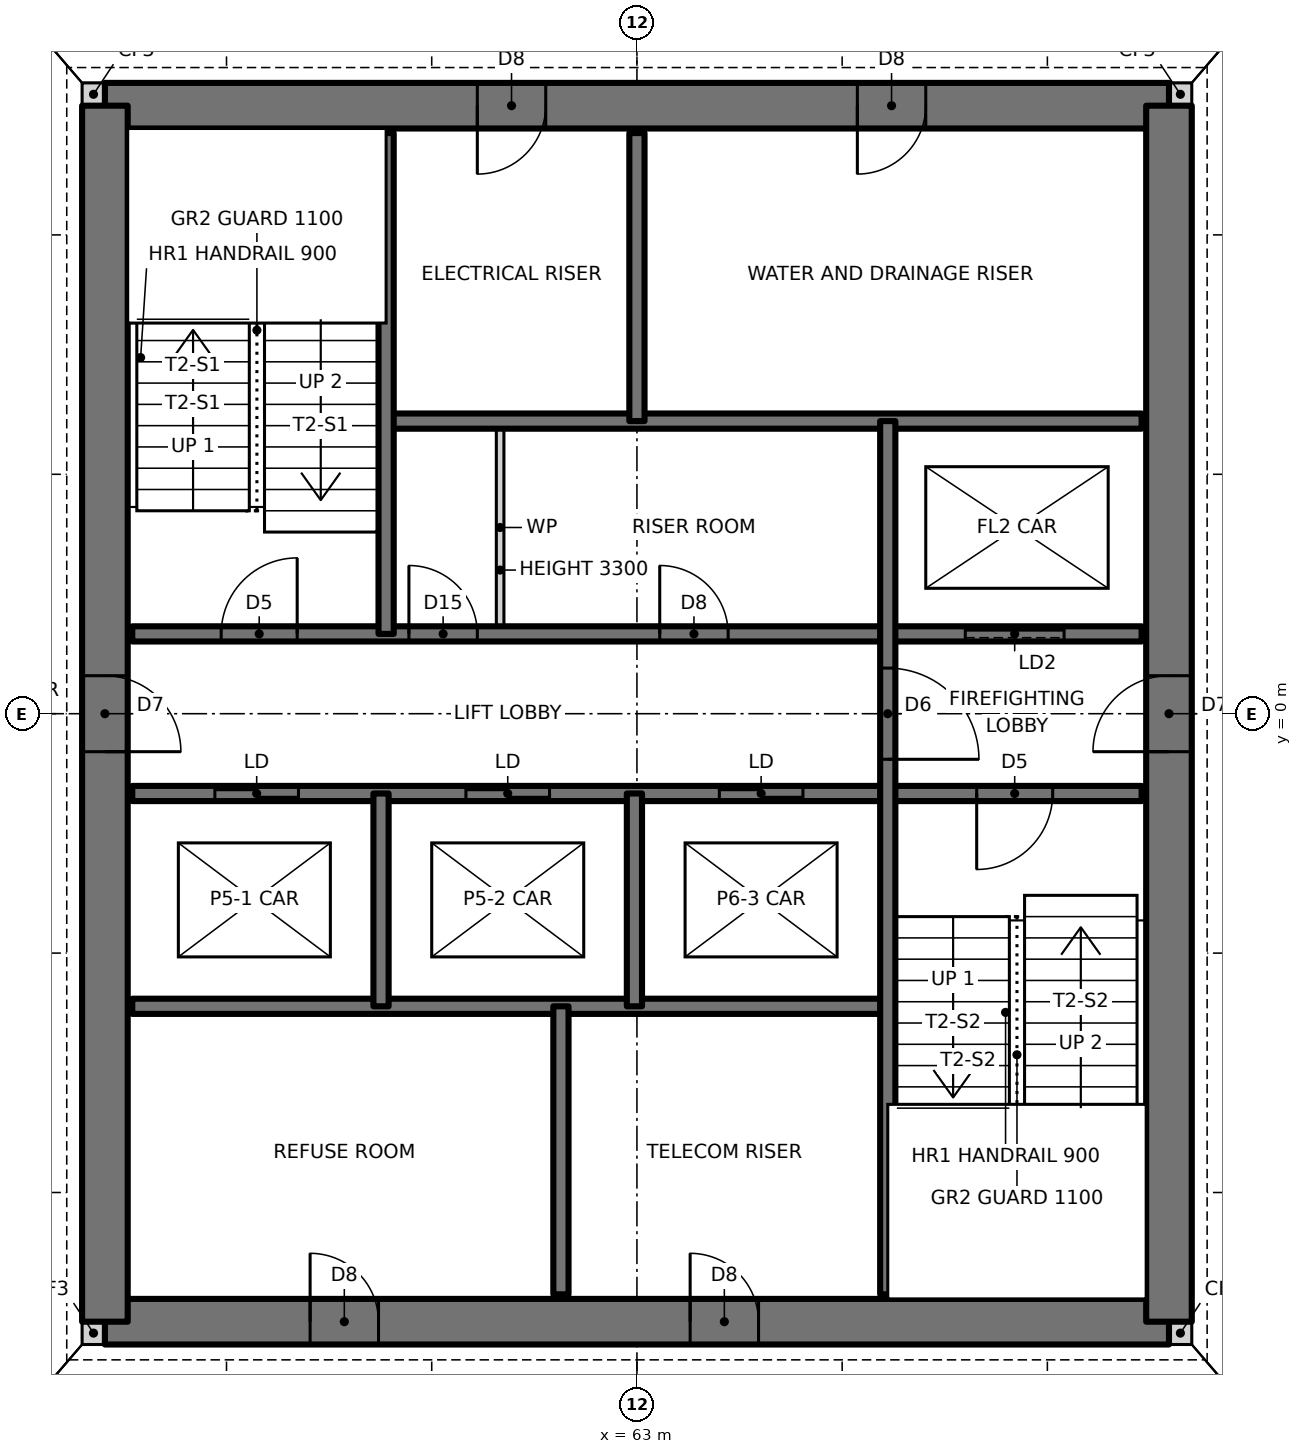
"""IFC4 building model, lengths in metres.
Left out: names, types, materials, properties, quantities, classifications, styles, units other than length and angle.
Written with IfcOpenShell. Run it as: python <this file> out.ifc"""

import sys

from ifc_helpers import new_model, si_unit, direction, frame, frame_2d, origin, place, context, subcontext, project, spatial, rectangle, extrude, element, fill, save


model = new_model("IFC4")
c1 = context("Model", 3, precision=1e-05, world=origin(), true_north=direction((0.0, 1.0)))
c2 = subcontext(c1, "Body", "Model", "MODEL_VIEW")
j1 = project(units=[si_unit("LENGTHUNIT", "METRE"), si_unit("PLANEANGLEUNIT", "RADIAN")], contexts=[c1])
p1 = place(None, origin())
s1 = spatial("IfcSite", under=j1, at=p1, CompositionType="ELEMENT")
p2 = place(p1, origin())
s2 = spatial("IfcBuilding", under=s1, at=p2, CompositionType="ELEMENT")
p3 = place(p2, frame((0.0, 0.0, 22.0)))
s3 = spatial("IfcBuildingStorey", under=s2, at=p3, CompositionType="ELEMENT", Elevation=22.0)
for number, where, z_axis, x_axis in (
    (1, (55.7, -8.15, 0.0), (0.0, 0.0, 1.0), (1.0, 0.0, 0.0)),
    (2, (70.0, -8.15, 0.0), (0.0, 0.0, 1.0), (1.0, 0.0, 0.0)),
    (3, (70.0, 8.15, 0.0), (0.0, 0.0, 1.0), (1.0, 0.0, 0.0)),
    (4, (55.7, 8.15, 0.0), (0.0, 0.0, 1.0), (1.0, 0.0, 0.0)),
):
    element("IfcWall", number, at=place(p3, frame(where, z_axis=z_axis, x_axis=x_axis)), inside=s3, PredefinedType="SOLIDWALL", context=c2, shape_type="SweptSolid", body=[
        extrude(rectangle(XDim=0.3, YDim=0.3, at=frame_2d((0.15, 0.0))), origin(), (0.0, 0.0, 1.0), 3.5),
    ])
p4 = place(p3, frame((56.0, -8.0, 0.0), z_axis=(0.0, 0.0, 1.0), x_axis=(1.0, 0.0, 0.0)))
e5 = element("IfcWall", 5, at=p4, inside=s3, PredefinedType="SHEAR", context=c2, shape_type="SweptSolid", body=[
    extrude(rectangle(XDim=14.0, YDim=0.6, at=frame_2d((7.0, 0.0))), origin(), (0.0, 0.0, 1.0), 3.5),
])
p5 = place(p4, frame((2.7, 0.0, 0.0)))
e6 = element("IfcOpeningElement", 6, at=p5, cuts=e5, PredefinedType="OPENING", context=c2, shape_type="SweptSolid", body=[
    extrude(rectangle(XDim=0.9, YDim=2.1, at=frame_2d((0.45, 1.05))), frame((0.0, 0.31, 0.0), z_axis=(0.0, -1.0, 0.0), x_axis=(1.0, 0.0, 0.0)), (0.0, 0.0, 1.0), 0.62),
])
p6 = place(p4, frame((7.7, 0.0, 0.0)))
e7 = element("IfcOpeningElement", 7, at=p6, cuts=e5, PredefinedType="OPENING", context=c2, shape_type="SweptSolid", body=[
    extrude(rectangle(XDim=0.9, YDim=2.1, at=frame_2d((0.45, 1.05))), frame((0.0, 0.31, 0.0), z_axis=(0.0, -1.0, 0.0), x_axis=(1.0, 0.0, 0.0)), (0.0, 0.0, 1.0), 0.62),
])
p7 = place(p3, frame((70.0, 8.0, 0.0), z_axis=(0.0, 0.0, 1.0), x_axis=(-1.0, 0.0, 0.0)))
e8 = element("IfcWall", 8, at=p7, inside=s3, PredefinedType="SHEAR", context=c2, shape_type="SweptSolid", body=[
    extrude(rectangle(XDim=14.0, YDim=0.6, at=frame_2d((7.0, 0.0))), origin(), (0.0, 0.0, 1.0), 3.5),
])
p8 = place(p7, frame((8.2, 0.0, 0.0)))
e9 = element("IfcOpeningElement", 9, at=p8, cuts=e8, PredefinedType="OPENING", context=c2, shape_type="SweptSolid", body=[
    extrude(rectangle(XDim=0.9, YDim=2.1, at=frame_2d((0.45, 1.05))), frame((0.0, 0.31, 0.0), z_axis=(0.0, -1.0, 0.0), x_axis=(1.0, 0.0, 0.0)), (0.0, 0.0, 1.0), 0.62),
])
p9 = place(p7, frame((3.2, 0.0, 0.0)))
e10 = element("IfcOpeningElement", 10, at=p9, cuts=e8, PredefinedType="OPENING", context=c2, shape_type="SweptSolid", body=[
    extrude(rectangle(XDim=0.9, YDim=2.1, at=frame_2d((0.45, 1.05))), frame((0.0, 0.31, 0.0), z_axis=(0.0, -1.0, 0.0), x_axis=(1.0, 0.0, 0.0)), (0.0, 0.0, 1.0), 0.62),
])
p10 = place(p3, frame((70.0, -8.0, 0.0), z_axis=(0.0, 0.0, 1.0), x_axis=(0.0, 1.0, 0.0)))
e11 = element("IfcWall", 11, at=p10, inside=s3, PredefinedType="SHEAR", context=c2, shape_type="SweptSolid", body=[
    extrude(rectangle(XDim=16.0, YDim=0.6, at=frame_2d((8.0, 0.0))), origin(), (0.0, 0.0, 1.0), 3.5),
])
p11 = place(p10, frame((7.5, 0.0, 0.0)))
e12 = element("IfcOpeningElement", 12, at=p11, cuts=e11, PredefinedType="OPENING", context=c2, shape_type="SweptSolid", body=[
    extrude(rectangle(XDim=1.0, YDim=2.1, at=frame_2d((0.5, 1.05))), frame((0.0, 0.31, 0.0), z_axis=(0.0, -1.0, 0.0), x_axis=(1.0, 0.0, 0.0)), (0.0, 0.0, 1.0), 0.62),
])
p12 = place(p3, frame((56.0, 8.0, 0.0), z_axis=(0.0, 0.0, 1.0), x_axis=(0.0, -1.0, 0.0)))
e13 = element("IfcWall", 13, at=p12, inside=s3, PredefinedType="SHEAR", context=c2, shape_type="SweptSolid", body=[
    extrude(rectangle(XDim=16.0, YDim=0.6, at=frame_2d((8.0, 0.0))), origin(), (0.0, 0.0, 1.0), 3.5),
])
p13 = place(p12, frame((7.5, 0.0, 0.0)))
e14 = element("IfcOpeningElement", 14, at=p13, cuts=e13, PredefinedType="OPENING", context=c2, shape_type="SweptSolid", body=[
    extrude(rectangle(XDim=1.0, YDim=2.1, at=frame_2d((0.5, 1.05))), frame((0.0, 0.31, 0.0), z_axis=(0.0, -1.0, 0.0), x_axis=(1.0, 0.0, 0.0)), (0.0, 0.0, 1.0), 0.62),
])
p14 = place(p3, frame((56.36, -3.85, 0.0), z_axis=(0.0, 0.0, 1.0), x_axis=(1.0, 0.0, 0.0)))
e15 = element("IfcWall", 15, at=p14, inside=s3, PredefinedType="SOLIDWALL", context=c2, shape_type="SweptSolid", body=[
    extrude(rectangle(XDim=9.94, YDim=0.2, at=frame_2d((4.97, 0.0))), origin(), (0.0, 0.0, 1.0), 3.5),
])
p15 = place(p3, frame((56.36, -1.05, 0.0), z_axis=(0.0, 0.0, 1.0), x_axis=(1.0, 0.0, 0.0)))
e16 = element("IfcWall", 16, at=p15, inside=s3, PredefinedType="SOLIDWALL", context=c2, shape_type="SweptSolid", body=[
    extrude(rectangle(XDim=13.28, YDim=0.2, at=frame_2d((6.64, 0.0))), origin(), (0.0, 0.0, 1.0), 3.5),
])
p16 = place(p15, frame((11.11, 0.0, 0.0)))
e17 = element("IfcOpeningElement", 17, at=p16, cuts=e16, PredefinedType="OPENING", context=c2, shape_type="SweptSolid", body=[
    extrude(rectangle(XDim=1.0, YDim=2.1, at=frame_2d((0.5, 1.05))), frame((0.0, 0.11, 0.0), z_axis=(0.0, -1.0, 0.0), x_axis=(1.0, 0.0, 0.0)), (0.0, 0.0, 1.0), 0.22),
])
p17 = place(p15, frame((1.087, 0.0, 0.0)))
e18 = element("IfcOpeningElement", 18, at=p17, cuts=e16, PredefinedType="OPENING", context=c2, shape_type="SweptSolid", body=[
    extrude(rectangle(XDim=1.1, YDim=2.1, at=frame_2d((0.55, 1.05))), frame((0.0, 0.11, 0.0), z_axis=(0.0, -1.0, 0.0), x_axis=(1.0, 0.0, 0.0)), (0.0, 0.0, 1.0), 0.22),
])
p18 = place(p15, frame((4.39, 0.0, 0.0)))
e19 = element("IfcOpeningElement", 19, at=p18, cuts=e16, PredefinedType="OPENING", context=c2, shape_type="SweptSolid", body=[
    extrude(rectangle(XDim=1.1, YDim=2.1, at=frame_2d((0.55, 1.05))), frame((0.0, 0.11, 0.0), z_axis=(0.0, -1.0, 0.0), x_axis=(1.0, 0.0, 0.0)), (0.0, 0.0, 1.0), 0.22),
])
p19 = place(p15, frame((7.724, 0.0, 0.0)))
e20 = element("IfcOpeningElement", 20, at=p19, cuts=e16, PredefinedType="OPENING", context=c2, shape_type="SweptSolid", body=[
    extrude(rectangle(XDim=1.1, YDim=2.1, at=frame_2d((0.55, 1.05))), frame((0.0, 0.11, 0.0), z_axis=(0.0, -1.0, 0.0), x_axis=(1.0, 0.0, 0.0)), (0.0, 0.0, 1.0), 0.22),
])
p20 = place(p3, frame((56.36, 1.05, 0.0), z_axis=(0.0, 0.0, 1.0), x_axis=(1.0, 0.0, 0.0)))
e21 = element("IfcWall", 21, at=p20, inside=s3, PredefinedType="SOLIDWALL", context=c2, shape_type="SweptSolid", body=[
    extrude(rectangle(XDim=13.28, YDim=0.2, at=frame_2d((6.64, 0.0))), origin(), (0.0, 0.0, 1.0), 3.5),
])
p21 = place(p20, frame((1.17, 0.0, 0.0)))
e22 = element("IfcOpeningElement", 22, at=p21, cuts=e21, PredefinedType="OPENING", context=c2, shape_type="SweptSolid", body=[
    extrude(rectangle(XDim=1.0, YDim=2.1, at=frame_2d((0.5, 1.05))), frame((0.0, 0.11, 0.0), z_axis=(0.0, -1.0, 0.0), x_axis=(1.0, 0.0, 0.0)), (0.0, 0.0, 1.0), 0.22),
])
p22 = place(p20, frame((6.94, 0.0, 0.0)))
e23 = element("IfcOpeningElement", 23, at=p22, cuts=e21, PredefinedType="OPENING", context=c2, shape_type="SweptSolid", body=[
    extrude(rectangle(XDim=0.9, YDim=2.1, at=frame_2d((0.45, 1.05))), frame((0.0, 0.11, 0.0), z_axis=(0.0, -1.0, 0.0), x_axis=(1.0, 0.0, 0.0)), (0.0, 0.0, 1.0), 0.22),
])
p23 = place(p20, frame((3.64, 0.0, 0.0)))
e24 = element("IfcOpeningElement", 24, at=p23, cuts=e21, PredefinedType="OPENING", context=c2, shape_type="SweptSolid", body=[
    extrude(rectangle(XDim=0.9, YDim=2.1, at=frame_2d((0.45, 1.05))), frame((0.0, 0.11, 0.0), z_axis=(0.0, -1.0, 0.0), x_axis=(1.0, 0.0, 0.0)), (0.0, 0.0, 1.0), 0.22),
])
p24 = place(p20, frame((10.96, 0.0, 0.0)))
e25 = element("IfcOpeningElement", 25, at=p24, cuts=e21, PredefinedType="OPENING", context=c2, shape_type="SweptSolid", body=[
    extrude(rectangle(XDim=1.3, YDim=2.1, at=frame_2d((0.65, 1.05))), frame((0.0, 0.11, 0.0), z_axis=(0.0, -1.0, 0.0), x_axis=(1.0, 0.0, 0.0)), (0.0, 0.0, 1.0), 0.22),
])
p25 = place(p3, frame((59.7, 3.85, 0.0), z_axis=(0.0, 0.0, 1.0), x_axis=(1.0, 0.0, 0.0)))
e26 = element("IfcWall", 26, at=p25, inside=s3, PredefinedType="SOLIDWALL", context=c2, shape_type="SweptSolid", body=[
    extrude(rectangle(XDim=9.94, YDim=0.2, at=frame_2d((4.97, 0.0))), origin(), (0.0, 0.0, 1.0), 3.5),
])
p26 = place(p3, frame((66.3, -7.64, 0.0), z_axis=(0.0, 0.0, 1.0), x_axis=(0.0, 1.0, 0.0)))
e27 = element("IfcWall", 27, at=p26, inside=s3, PredefinedType="SOLIDWALL", context=c2, shape_type="SweptSolid", body=[
    extrude(rectangle(XDim=11.49, YDim=0.2, at=frame_2d((5.745, 0.0))), origin(), (0.0, 0.0, 1.0), 3.5),
])
p27 = place(p26, frame((7.04, 0.0, 0.0)))
e28 = element("IfcOpeningElement", 28, at=p27, cuts=e27, PredefinedType="OPENING", context=c2, shape_type="SweptSolid", body=[
    extrude(rectangle(XDim=1.2, YDim=2.1, at=frame_2d((0.6, 1.05))), frame((0.0, 0.11, 0.0), z_axis=(0.0, -1.0, 0.0), x_axis=(1.0, 0.0, 0.0)), (0.0, 0.0, 1.0), 0.22),
])
p28 = place(p3, frame((63.0, 3.85, 0.0), z_axis=(0.0, 0.0, 1.0), x_axis=(0.0, 1.0, 0.0)))
e29 = element("IfcWall", 29, at=p28, inside=s3, PredefinedType="SOLIDWALL", context=c2, shape_type="SweptSolid", body=[
    extrude(rectangle(XDim=3.79, YDim=0.2, at=frame_2d((1.895, 0.0))), origin(), (0.0, 0.0, 1.0), 3.5),
])
p29 = place(p3, frame((62.967, -3.85, 0.0), z_axis=(0.0, 0.0, 1.0), x_axis=(0.0, 1.0, 0.0)))
e30 = element("IfcWall", 30, at=p29, inside=s3, PredefinedType="SOLIDWALL", context=c2, shape_type="SweptSolid", body=[
    extrude(rectangle(XDim=2.8, YDim=0.2, at=frame_2d((1.4, 0.0))), origin(), (0.0, 0.0, 1.0), 3.5),
])
p30 = place(p3, frame((62.0, -7.64, 0.0), z_axis=(0.0, 0.0, 1.0), x_axis=(0.0, 1.0, 0.0)))
e31 = element("IfcWall", 31, at=p30, inside=s3, PredefinedType="SOLIDWALL", context=c2, shape_type="SweptSolid", body=[
    extrude(rectangle(XDim=3.79, YDim=0.2, at=frame_2d((1.895, 0.0))), origin(), (0.0, 0.0, 1.0), 3.5),
])
p31 = place(p3, frame((61.2, 1.05, 0.0), z_axis=(0.0, 0.0, 1.0), x_axis=(0.0, 1.0, 0.0)))
e32 = element("IfcWall", 32, at=p31, inside=s3, PredefinedType="PARTITIONING", context=c2, shape_type="SweptSolid", body=[
    extrude(rectangle(XDim=2.8, YDim=0.1, at=frame_2d((1.4, 0.0))), origin(), (0.0, 0.0, 1.0), 3.3),
])
p32 = place(p3, frame((59.7, 1.05, 0.0), z_axis=(0.0, 0.0, 1.0), x_axis=(0.0, 1.0, 0.0)))
e33 = element("IfcWall", 33, at=p32, inside=s3, PredefinedType="SOLIDWALL", context=c2, shape_type="SweptSolid", body=[
    extrude(rectangle(XDim=6.59, YDim=0.2, at=frame_2d((3.295, 0.0))), origin(), (0.0, 0.0, 1.0), 3.5),
])
p33 = place(p3, frame((59.633, -3.85, 0.0), z_axis=(0.0, 0.0, 1.0), x_axis=(0.0, 1.0, 0.0)))
e34 = element("IfcWall", 34, at=p33, inside=s3, PredefinedType="SOLIDWALL", context=c2, shape_type="SweptSolid", body=[
    extrude(rectangle(XDim=2.8, YDim=0.2, at=frame_2d((1.4, 0.0))), origin(), (0.0, 0.0, 1.0), 3.5),
])
p34 = place(p21, origin())
e35 = element("IfcDoor", 35, at=p34, inside=s3, OperationType="SINGLE_SWING_RIGHT", PredefinedType="DOOR", context=c2, shape_type="SweptSolid", body=[
    extrude(rectangle(XDim=1.0, YDim=2.1, at=frame_2d((0.5, 1.05))), frame((0.0, 0.025, 0.0), z_axis=(0.0, -1.0, 0.0), x_axis=(1.0, 0.0, 0.0)), (0.0, 0.0, 1.0), 0.05),
])
fill(e22, e35)
p35 = place(p16, frame((1.0, 0.0, 0.0), z_axis=(0.0, 0.0, 1.0), x_axis=(-1.0, 0.0, 0.0)))
e36 = element("IfcDoor", 36, at=p35, inside=s3, OperationType="SINGLE_SWING_RIGHT", PredefinedType="DOOR", context=c2, shape_type="SweptSolid", body=[
    extrude(rectangle(XDim=1.0, YDim=2.1, at=frame_2d((0.5, 1.05))), frame((0.0, 0.025, 0.0), z_axis=(0.0, -1.0, 0.0), x_axis=(1.0, 0.0, 0.0)), (0.0, 0.0, 1.0), 0.05),
])
fill(e17, e36)
p36 = place(p27, frame((1.2, 0.0, 0.0), z_axis=(0.0, 0.0, 1.0), x_axis=(-1.0, 0.0, 0.0)))
e37 = element("IfcDoor", 37, at=p36, inside=s3, OperationType="SINGLE_SWING_RIGHT", PredefinedType="DOOR", context=c2, shape_type="SweptSolid", body=[
    extrude(rectangle(XDim=1.2, YDim=2.1, at=frame_2d((0.6, 1.05))), frame((0.0, 0.025, 0.0), z_axis=(0.0, -1.0, 0.0), x_axis=(1.0, 0.0, 0.0)), (0.0, 0.0, 1.0), 0.05),
])
fill(e28, e37)
p37 = place(p22, origin())
e38 = element("IfcDoor", 38, at=p37, inside=s3, OperationType="SINGLE_SWING_LEFT", PredefinedType="DOOR", context=c2, shape_type="SweptSolid", body=[
    extrude(rectangle(XDim=0.9, YDim=2.1, at=frame_2d((0.45, 1.05))), frame((0.0, 0.025, 0.0), z_axis=(0.0, -1.0, 0.0), x_axis=(1.0, 0.0, 0.0)), (0.0, 0.0, 1.0), 0.05),
])
fill(e23, e38)
p38 = place(p23, origin())
e39 = element("IfcDoor", 39, at=p38, inside=s3, OperationType="SINGLE_SWING_LEFT", PredefinedType="DOOR", context=c2, shape_type="SweptSolid", body=[
    extrude(rectangle(XDim=0.9, YDim=2.1, at=frame_2d((0.45, 1.05))), frame((0.0, 0.025, 0.0), z_axis=(0.0, -1.0, 0.0), x_axis=(1.0, 0.0, 0.0)), (0.0, 0.0, 1.0), 0.05),
])
fill(e24, e39)
p39 = place(p13, origin())
e40 = element("IfcDoor", 40, at=p39, inside=s3, OperationType="SINGLE_SWING_RIGHT", PredefinedType="DOOR", context=c2, shape_type="SweptSolid", body=[
    extrude(rectangle(XDim=1.0, YDim=2.1, at=frame_2d((0.5, 1.05))), frame((0.0, 0.025, 0.0), z_axis=(0.0, -1.0, 0.0), x_axis=(1.0, 0.0, 0.0)), (0.0, 0.0, 1.0), 0.05),
])
fill(e14, e40)
p40 = place(p11, origin())
e41 = element("IfcDoor", 41, at=p40, inside=s3, OperationType="SINGLE_SWING_LEFT", PredefinedType="DOOR", context=c2, shape_type="SweptSolid", body=[
    extrude(rectangle(XDim=1.0, YDim=2.1, at=frame_2d((0.5, 1.05))), frame((0.0, 0.025, 0.0), z_axis=(0.0, -1.0, 0.0), x_axis=(1.0, 0.0, 0.0)), (0.0, 0.0, 1.0), 0.05),
])
fill(e12, e41)
p41 = place(p8, origin())
e42 = element("IfcDoor", 42, at=p41, inside=s3, OperationType="SINGLE_SWING_RIGHT", PredefinedType="DOOR", context=c2, shape_type="SweptSolid", body=[
    extrude(rectangle(XDim=0.9, YDim=2.1, at=frame_2d((0.45, 1.05))), frame((0.0, 0.025, 0.0), z_axis=(0.0, -1.0, 0.0), x_axis=(1.0, 0.0, 0.0)), (0.0, 0.0, 1.0), 0.05),
])
fill(e9, e42)
p42 = place(p9, origin())
e43 = element("IfcDoor", 43, at=p42, inside=s3, OperationType="SINGLE_SWING_RIGHT", PredefinedType="DOOR", context=c2, shape_type="SweptSolid", body=[
    extrude(rectangle(XDim=0.9, YDim=2.1, at=frame_2d((0.45, 1.05))), frame((0.0, 0.025, 0.0), z_axis=(0.0, -1.0, 0.0), x_axis=(1.0, 0.0, 0.0)), (0.0, 0.0, 1.0), 0.05),
])
fill(e10, e43)
p43 = place(p5, origin())
e44 = element("IfcDoor", 44, at=p43, inside=s3, OperationType="SINGLE_SWING_LEFT", PredefinedType="DOOR", context=c2, shape_type="SweptSolid", body=[
    extrude(rectangle(XDim=0.9, YDim=2.1, at=frame_2d((0.45, 1.05))), frame((0.0, 0.025, 0.0), z_axis=(0.0, -1.0, 0.0), x_axis=(1.0, 0.0, 0.0)), (0.0, 0.0, 1.0), 0.05),
])
fill(e6, e44)
p44 = place(p6, origin())
e45 = element("IfcDoor", 45, at=p44, inside=s3, OperationType="SINGLE_SWING_LEFT", PredefinedType="DOOR", context=c2, shape_type="SweptSolid", body=[
    extrude(rectangle(XDim=0.9, YDim=2.1, at=frame_2d((0.45, 1.05))), frame((0.0, 0.025, 0.0), z_axis=(0.0, -1.0, 0.0), x_axis=(1.0, 0.0, 0.0)), (0.0, 0.0, 1.0), 0.05),
])
fill(e7, e45)
p45 = place(p17, origin())
e46 = element("IfcDoor", 46, at=p45, inside=s3, OperationType="DOUBLE_DOOR_SLIDING", PredefinedType="DOOR", context=c2, shape_type="SweptSolid", body=[
    extrude(rectangle(XDim=1.1, YDim=2.1, at=frame_2d((0.55, 1.05))), frame((0.0, 0.025, 0.0), z_axis=(0.0, -1.0, 0.0), x_axis=(1.0, 0.0, 0.0)), (0.0, 0.0, 1.0), 0.05),
])
fill(e18, e46)
p46 = place(p18, origin())
e47 = element("IfcDoor", 47, at=p46, inside=s3, OperationType="DOUBLE_DOOR_SLIDING", PredefinedType="DOOR", context=c2, shape_type="SweptSolid", body=[
    extrude(rectangle(XDim=1.1, YDim=2.1, at=frame_2d((0.55, 1.05))), frame((0.0, 0.025, 0.0), z_axis=(0.0, -1.0, 0.0), x_axis=(1.0, 0.0, 0.0)), (0.0, 0.0, 1.0), 0.05),
])
fill(e19, e47)
p47 = place(p19, origin())
e48 = element("IfcDoor", 48, at=p47, inside=s3, OperationType="DOUBLE_DOOR_SLIDING", PredefinedType="DOOR", context=c2, shape_type="SweptSolid", body=[
    extrude(rectangle(XDim=1.1, YDim=2.1, at=frame_2d((0.55, 1.05))), frame((0.0, 0.025, 0.0), z_axis=(0.0, -1.0, 0.0), x_axis=(1.0, 0.0, 0.0)), (0.0, 0.0, 1.0), 0.05),
])
fill(e20, e48)
p48 = place(p24, origin())
e49 = element("IfcDoor", 49, at=p48, inside=s3, OperationType="SLIDING_TO_LEFT", PredefinedType="DOOR", context=c2, shape_type="SweptSolid", body=[
    extrude(rectangle(XDim=1.3, YDim=2.1, at=frame_2d((0.65, 1.05))), frame((0.0, 0.025, 0.0), z_axis=(0.0, -1.0, 0.0), x_axis=(1.0, 0.0, 0.0)), (0.0, 0.0, 1.0), 0.05),
])
fill(e25, e49)
save(model, sys.argv[1])
